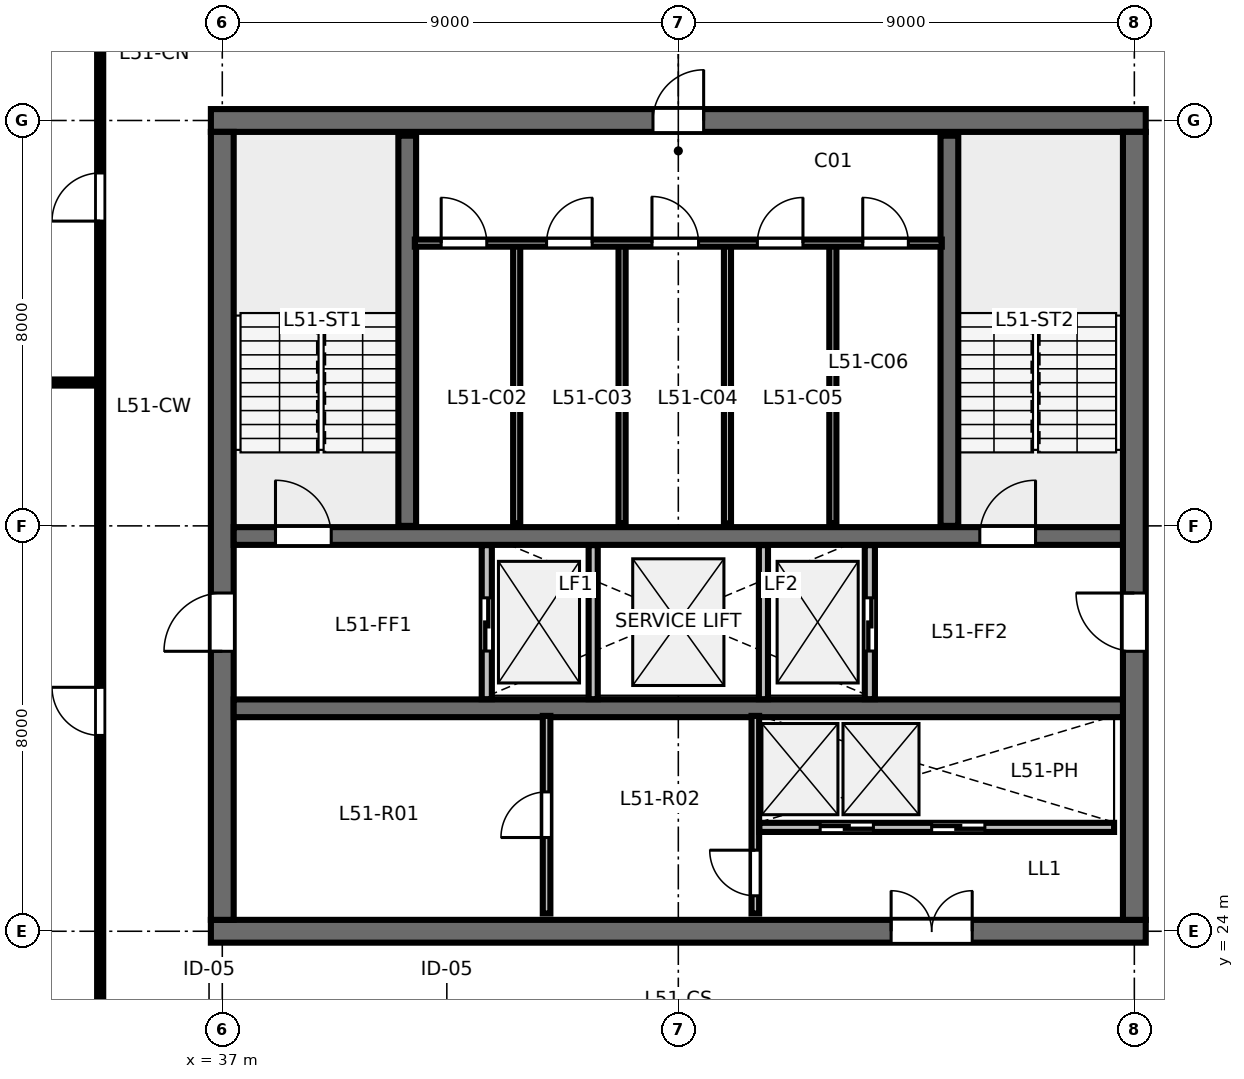
"""IFC4 building model, lengths in metres.
Left out: names, types, materials, properties, quantities, classifications, styles, units other than length and angle.
Written with IfcOpenShell. Run it as: python <this file> out.ifc"""

import sys

from ifc_helpers import new_model, si_unit, direction, frame, frame_2d, origin, place, context, subcontext, project, spatial, rectangle, extrude, element, fill, save


model = new_model("IFC4")
c1 = context("Model", 3, precision=1e-05, world=origin(), true_north=direction((0.0, 1.0)))
c2 = subcontext(c1, "Body", "Model", "MODEL_VIEW")
j1 = project(units=[si_unit("LENGTHUNIT", "METRE"), si_unit("PLANEANGLEUNIT", "RADIAN")], contexts=[c1])
p1 = place(None, origin())
s1 = spatial("IfcSite", under=j1, at=p1, CompositionType="ELEMENT")
p2 = place(p1, origin())
s2 = spatial("IfcBuilding", under=s1, at=p2, CompositionType="ELEMENT")
p3 = place(p2, frame((0.0, 0.0, 195.0)))
s3 = spatial("IfcBuildingStorey", under=s2, at=p3, CompositionType="ELEMENT", Elevation=195.0)
p4 = place(p3, frame((36.775, 24.0, 0.0), z_axis=(0.0, 0.0, 1.0), x_axis=(1.0, 0.0, 0.0)))
e1 = element("IfcWall", 1, at=p4, inside=s3, PredefinedType="SHEAR", context=c2, shape_type="SweptSolid", body=[
    extrude(rectangle(XDim=18.45, YDim=0.45, at=frame_2d((9.225, 0.0))), origin(), (0.0, 0.0, 1.0), 3.36),
])
p5 = place(p4, frame((13.425, 0.0, 0.0)))
e2 = element("IfcOpeningElement", 2, at=p5, cuts=e1, PredefinedType="OPENING", context=c2, shape_type="SweptSolid", body=[
    extrude(rectangle(XDim=1.6, YDim=2.15, at=frame_2d((0.8, 1.075))), frame((0.0, 0.235, 0.0), z_axis=(0.0, -1.0, 0.0), x_axis=(1.0, 0.0, 0.0)), (0.0, 0.0, 1.0), 0.47),
])
p6 = place(p3, frame((36.775, 40.0, 0.0), z_axis=(0.0, 0.0, 1.0), x_axis=(1.0, 0.0, 0.0)))
e3 = element("IfcWall", 3, at=p6, inside=s3, PredefinedType="SHEAR", context=c2, shape_type="SweptSolid", body=[
    extrude(rectangle(XDim=18.45, YDim=0.45, at=frame_2d((9.225, 0.0))), origin(), (0.0, 0.0, 1.0), 3.36),
])
p7 = place(p6, frame((8.725, 0.0, 0.0)))
e4 = element("IfcOpeningElement", 4, at=p7, cuts=e3, PredefinedType="OPENING", context=c2, shape_type="SweptSolid", body=[
    extrude(rectangle(XDim=1.0, YDim=2.15, at=frame_2d((0.5, 1.075))), frame((0.0, 0.235, 0.0), z_axis=(0.0, -1.0, 0.0), x_axis=(1.0, 0.0, 0.0)), (0.0, 0.0, 1.0), 0.47),
])
p8 = place(p3, frame((37.0, 24.225, 0.0), z_axis=(0.0, 0.0, 1.0), x_axis=(0.0, 1.0, 0.0)))
e5 = element("IfcWall", 5, at=p8, inside=s3, PredefinedType="SHEAR", context=c2, shape_type="SweptSolid", body=[
    extrude(rectangle(XDim=15.55, YDim=0.45, at=frame_2d((7.775, 0.0))), origin(), (0.0, 0.0, 1.0), 3.36),
])
p9 = place(p8, frame((5.3, 0.0, 0.0)))
e6 = element("IfcOpeningElement", 6, at=p9, cuts=e5, PredefinedType="OPENING", context=c2, shape_type="SweptSolid", body=[
    extrude(rectangle(XDim=1.15, YDim=2.15, at=frame_2d((0.575, 1.075))), frame((0.0, 0.235, 0.0), z_axis=(0.0, -1.0, 0.0), x_axis=(1.0, 0.0, 0.0)), (0.0, 0.0, 1.0), 0.47),
])
p10 = place(p3, frame((55.0, 24.225, 0.0), z_axis=(0.0, 0.0, 1.0), x_axis=(0.0, 1.0, 0.0)))
e7 = element("IfcWall", 7, at=p10, inside=s3, PredefinedType="SHEAR", context=c2, shape_type="SweptSolid", body=[
    extrude(rectangle(XDim=15.55, YDim=0.45, at=frame_2d((7.775, 0.0))), origin(), (0.0, 0.0, 1.0), 3.36),
])
p11 = place(p10, frame((5.3, 0.0, 0.0)))
e8 = element("IfcOpeningElement", 8, at=p11, cuts=e7, PredefinedType="OPENING", context=c2, shape_type="SweptSolid", body=[
    extrude(rectangle(XDim=1.15, YDim=2.15, at=frame_2d((0.575, 1.075))), frame((0.0, 0.235, 0.0), z_axis=(0.0, -1.0, 0.0), x_axis=(1.0, 0.0, 0.0)), (0.0, 0.0, 1.0), 0.47),
])
p12 = place(p3, frame((37.225, 31.8, 0.0), z_axis=(0.0, 0.0, 1.0), x_axis=(1.0, 0.0, 0.0)))
e9 = element("IfcWall", 9, at=p12, inside=s3, PredefinedType="SHEAR", context=c2, shape_type="SweptSolid", body=[
    extrude(rectangle(XDim=17.55, YDim=0.35, at=frame_2d((8.775, 0.0))), origin(), (0.0, 0.0, 1.0), 3.36),
])
p13 = place(p12, frame((0.825, 0.0, 0.0)))
e10 = element("IfcOpeningElement", 10, at=p13, cuts=e9, PredefinedType="OPENING", context=c2, shape_type="SweptSolid", body=[
    extrude(rectangle(XDim=1.1, YDim=2.15, at=frame_2d((0.55, 1.075))), frame((0.0, 0.185, 0.0), z_axis=(0.0, -1.0, 0.0), x_axis=(1.0, 0.0, 0.0)), (0.0, 0.0, 1.0), 0.37),
])
p14 = place(p12, frame((14.725, 0.0, 0.0)))
e11 = element("IfcOpeningElement", 11, at=p14, cuts=e9, PredefinedType="OPENING", context=c2, shape_type="SweptSolid", body=[
    extrude(rectangle(XDim=1.1, YDim=2.15, at=frame_2d((0.55, 1.075))), frame((0.0, 0.185, 0.0), z_axis=(0.0, -1.0, 0.0), x_axis=(1.0, 0.0, 0.0)), (0.0, 0.0, 1.0), 0.37),
])
p15 = place(p3, frame((37.225, 28.4, 0.0), z_axis=(0.0, 0.0, 1.0), x_axis=(1.0, 0.0, 0.0)))
e12 = element("IfcWall", 12, at=p15, inside=s3, PredefinedType="SHEAR", context=c2, shape_type="SweptSolid", body=[
    extrude(rectangle(XDim=17.55, YDim=0.35, at=frame_2d((8.775, 0.0))), origin(), (0.0, 0.0, 1.0), 3.36),
])
for number, where, z_axis, x_axis in (
    (13, (40.65, 32.0, 0.0), (0.0, 0.0, 1.0), (0.0, 1.0, 0.0)),
    (14, (51.35, 32.0, 0.0), (0.0, 0.0, 1.0), (0.0, 1.0, 0.0)),
):
    element("IfcWall", number, at=place(p3, frame(where, z_axis=z_axis, x_axis=x_axis)), inside=s3, PredefinedType="SHEAR", context=c2, shape_type="SweptSolid", body=[
        extrude(rectangle(XDim=7.7, YDim=0.35, at=frame_2d((3.85, 0.0))), origin(), (0.0, 0.0, 1.0), 3.6),
    ])
for number, where, z_axis, x_axis in (
    (15, (42.81, 32.05, 0.0), (0.0, 0.0, 1.0), (0.0, 1.0, 0.0)),
    (16, (44.89, 32.05, 0.0), (0.0, 0.0, 1.0), (0.0, 1.0, 0.0)),
    (17, (46.97, 32.05, 0.0), (0.0, 0.0, 1.0), (0.0, 1.0, 0.0)),
    (18, (49.05, 32.05, 0.0), (0.0, 0.0, 1.0), (0.0, 1.0, 0.0)),
):
    element("IfcWall", number, at=place(p3, frame(where, z_axis=z_axis, x_axis=x_axis)), inside=s3, PredefinedType="PARTITIONING", context=c2, shape_type="SweptSolid", body=[
        extrude(rectangle(XDim=5.5, YDim=0.14, at=frame_2d((2.75, 0.0))), origin(), (0.0, 0.0, 1.0), 3.375),
    ])
p16 = place(p3, frame((40.8, 37.58, 0.0), z_axis=(0.0, 0.0, 1.0), x_axis=(1.0, 0.0, 0.0)))
e19 = element("IfcWall", 19, at=p16, inside=s3, PredefinedType="PARTITIONING", context=c2, shape_type="SweptSolid", body=[
    extrude(rectangle(XDim=10.4, YDim=0.14, at=frame_2d((5.2, 0.0))), origin(), (0.0, 0.0, 1.0), 3.375),
])
p17 = place(p16, frame((0.52, 0.0, 0.0)))
e20 = element("IfcOpeningElement", 20, at=p17, cuts=e19, PredefinedType="OPENING", context=c2, shape_type="SweptSolid", body=[
    extrude(rectangle(XDim=0.9, YDim=2.15, at=frame_2d((0.45, 1.075))), frame((0.0, 0.08, 0.0), z_axis=(0.0, -1.0, 0.0), x_axis=(1.0, 0.0, 0.0)), (0.0, 0.0, 1.0), 0.16),
])
p18 = place(p16, frame((2.6, 0.0, 0.0)))
e21 = element("IfcOpeningElement", 21, at=p18, cuts=e19, PredefinedType="OPENING", context=c2, shape_type="SweptSolid", body=[
    extrude(rectangle(XDim=0.9, YDim=2.15, at=frame_2d((0.45, 1.075))), frame((0.0, 0.08, 0.0), z_axis=(0.0, -1.0, 0.0), x_axis=(1.0, 0.0, 0.0)), (0.0, 0.0, 1.0), 0.16),
])
p19 = place(p16, frame((4.68, 0.0, 0.0)))
e22 = element("IfcOpeningElement", 22, at=p19, cuts=e19, PredefinedType="OPENING", context=c2, shape_type="SweptSolid", body=[
    extrude(rectangle(XDim=0.92, YDim=2.15, at=frame_2d((0.46, 1.075))), frame((0.0, 0.08, 0.0), z_axis=(0.0, -1.0, 0.0), x_axis=(1.0, 0.0, 0.0)), (0.0, 0.0, 1.0), 0.16),
])
p20 = place(p16, frame((6.76, 0.0, 0.0)))
e23 = element("IfcOpeningElement", 23, at=p20, cuts=e19, PredefinedType="OPENING", context=c2, shape_type="SweptSolid", body=[
    extrude(rectangle(XDim=0.9, YDim=2.15, at=frame_2d((0.45, 1.075))), frame((0.0, 0.08, 0.0), z_axis=(0.0, -1.0, 0.0), x_axis=(1.0, 0.0, 0.0)), (0.0, 0.0, 1.0), 0.16),
])
p21 = place(p16, frame((8.84, 0.0, 0.0)))
e24 = element("IfcOpeningElement", 24, at=p21, cuts=e19, PredefinedType="OPENING", context=c2, shape_type="SweptSolid", body=[
    extrude(rectangle(XDim=0.9, YDim=2.15, at=frame_2d((0.45, 1.075))), frame((0.0, 0.08, 0.0), z_axis=(0.0, -1.0, 0.0), x_axis=(1.0, 0.0, 0.0)), (0.0, 0.0, 1.0), 0.16),
])
p22 = place(p3, frame((42.22, 28.58, 0.0), z_axis=(0.0, 0.0, 1.0), x_axis=(0.0, 1.0, 0.0)))
e25 = element("IfcWall", 25, at=p22, inside=s3, PredefinedType="PARTITIONING", context=c2, shape_type="SweptSolid", body=[
    extrude(rectangle(XDim=3.04, YDim=0.2, at=frame_2d((1.52, 0.0))), origin(), (0.0, 0.0, 1.0), 3.375),
])
p23 = place(p22, frame((0.95, 0.0, 0.0)))
e26 = element("IfcOpeningElement", 26, at=p23, cuts=e25, PredefinedType="OPENING", context=c2, shape_type="SweptSolid", body=[
    extrude(rectangle(XDim=1.05, YDim=2.15, at=frame_2d((0.525, 1.075))), frame((0.0, 0.11, 0.0), z_axis=(0.0, -1.0, 0.0), x_axis=(1.0, 0.0, 0.0)), (0.0, 0.0, 1.0), 0.22),
])
p24 = place(p3, frame((49.78, 28.58, 0.0), z_axis=(0.0, 0.0, 1.0), x_axis=(0.0, 1.0, 0.0)))
e27 = element("IfcWall", 27, at=p24, inside=s3, PredefinedType="PARTITIONING", context=c2, shape_type="SweptSolid", body=[
    extrude(rectangle(XDim=3.04, YDim=0.2, at=frame_2d((1.52, 0.0))), origin(), (0.0, 0.0, 1.0), 3.375),
])
p25 = place(p24, frame((0.95, 0.0, 0.0)))
e28 = element("IfcOpeningElement", 28, at=p25, cuts=e27, PredefinedType="OPENING", context=c2, shape_type="SweptSolid", body=[
    extrude(rectangle(XDim=1.05, YDim=2.15, at=frame_2d((0.525, 1.075))), frame((0.0, 0.11, 0.0), z_axis=(0.0, -1.0, 0.0), x_axis=(1.0, 0.0, 0.0)), (0.0, 0.0, 1.0), 0.22),
])
for number, where, z_axis, x_axis in (
    (29, (44.32, 28.58, 0.0), (0.0, 0.0, 1.0), (0.0, 1.0, 0.0)),
    (30, (47.68, 28.58, 0.0), (0.0, 0.0, 1.0), (0.0, 1.0, 0.0)),
):
    element("IfcWall", number, at=place(p3, frame(where, z_axis=z_axis, x_axis=x_axis)), inside=s3, PredefinedType="PARTITIONING", context=c2, shape_type="SweptSolid", body=[
        extrude(rectangle(XDim=3.04, YDim=0.18, at=frame_2d((1.52, 0.0))), origin(), (0.0, 0.0, 1.0), 3.375),
    ])
p26 = place(p3, frame((43.4, 24.35, 0.0), z_axis=(0.0, 0.0, 1.0), x_axis=(0.0, 1.0, 0.0)))
e31 = element("IfcWall", 31, at=p26, inside=s3, PredefinedType="PARTITIONING", context=c2, shape_type="SweptSolid", body=[
    extrude(rectangle(XDim=3.9, YDim=0.15, at=frame_2d((1.95, 0.0))), origin(), (0.0, 0.0, 1.0), 3.375),
])
p27 = place(p26, frame((1.5, 0.0, 0.0)))
e32 = element("IfcOpeningElement", 32, at=p27, cuts=e31, PredefinedType="OPENING", context=c2, shape_type="SweptSolid", body=[
    extrude(rectangle(XDim=0.9, YDim=2.15, at=frame_2d((0.45, 1.075))), frame((0.0, 0.085, 0.0), z_axis=(0.0, -1.0, 0.0), x_axis=(1.0, 0.0, 0.0)), (0.0, 0.0, 1.0), 0.17),
])
p28 = place(p3, frame((47.52, 24.35, 0.0), z_axis=(0.0, 0.0, 1.0), x_axis=(0.0, 1.0, 0.0)))
e33 = element("IfcWall", 33, at=p28, inside=s3, PredefinedType="PARTITIONING", context=c2, shape_type="SweptSolid", body=[
    extrude(rectangle(XDim=3.9, YDim=0.15, at=frame_2d((1.95, 0.0))), origin(), (0.0, 0.0, 1.0), 3.375),
])
p29 = place(p28, frame((0.35, 0.0, 0.0)))
e34 = element("IfcOpeningElement", 34, at=p29, cuts=e33, PredefinedType="OPENING", context=c2, shape_type="SweptSolid", body=[
    extrude(rectangle(XDim=0.9, YDim=2.15, at=frame_2d((0.45, 1.075))), frame((0.0, 0.085, 0.0), z_axis=(0.0, -1.0, 0.0), x_axis=(1.0, 0.0, 0.0)), (0.0, 0.0, 1.0), 0.17),
])
p30 = place(p3, frame((47.6, 26.05, 0.0), z_axis=(0.0, 0.0, 1.0), x_axis=(1.0, 0.0, 0.0)))
e35 = element("IfcWall", 35, at=p30, inside=s3, PredefinedType="PARTITIONING", context=c2, shape_type="SweptSolid", body=[
    extrude(rectangle(XDim=7.0, YDim=0.18, at=frame_2d((3.5, 0.0))), origin(), (0.0, 0.0, 1.0), 3.375),
])
p31 = place(p30, frame((1.2, 0.0, 0.0)))
e36 = element("IfcOpeningElement", 36, at=p31, cuts=e35, PredefinedType="OPENING", context=c2, shape_type="SweptSolid", body=[
    extrude(rectangle(XDim=1.05, YDim=2.15, at=frame_2d((0.525, 1.075))), frame((0.0, 0.1, 0.0), z_axis=(0.0, -1.0, 0.0), x_axis=(1.0, 0.0, 0.0)), (0.0, 0.0, 1.0), 0.2),
])
p32 = place(p30, frame((3.4, 0.0, 0.0)))
e37 = element("IfcOpeningElement", 37, at=p32, cuts=e35, PredefinedType="OPENING", context=c2, shape_type="SweptSolid", body=[
    extrude(rectangle(XDim=1.05, YDim=2.15, at=frame_2d((0.525, 1.075))), frame((0.0, 0.1, 0.0), z_axis=(0.0, -1.0, 0.0), x_axis=(1.0, 0.0, 0.0)), (0.0, 0.0, 1.0), 0.2),
])
p33 = place(p3, frame((34.59, 34.829, 0.0), z_axis=(0.0, 0.0, 1.0), x_axis=(-1.0, 0.0, 0.0)))
e38 = element("IfcWall", 38, at=p33, inside=s3, PredefinedType="PARTITIONING", context=c2, shape_type="SweptSolid", body=[
    extrude(rectangle(XDim=10.19, YDim=0.12, at=frame_2d((5.095, 0.0))), origin(), (0.0, 0.0, 1.0), 2.655),
])
p34 = place(p33, frame((1.4, 0.0, 0.0)))
e39 = element("IfcOpeningElement", 39, at=p34, cuts=e38, PredefinedType="OPENING", context=c2, shape_type="SweptSolid", body=[
    extrude(rectangle(XDim=0.9, YDim=2.15, at=frame_2d((0.45, 1.075))), frame((0.0, 0.07, 0.0), z_axis=(0.0, -1.0, 0.0), x_axis=(1.0, 0.0, 0.0)), (0.0, 0.0, 1.0), 0.14),
])
p35 = place(p3, frame((34.59, 21.65, 0.0), z_axis=(0.0, 0.0, 1.0), x_axis=(0.0, 1.0, 0.0)))
e40 = element("IfcWall", 40, at=p35, inside=s3, PredefinedType="PARTITIONING", context=c2, shape_type="SweptSolid", body=[
    extrude(rectangle(XDim=20.7, YDim=0.12, at=frame_2d((10.35, 0.0))), origin(), (0.0, 0.0, 1.0), 2.655),
])
p36 = place(p35, frame((6.214, 0.0, 0.0)))
e41 = element("IfcOpeningElement", 41, at=p36, cuts=e40, PredefinedType="OPENING", context=c2, shape_type="SweptSolid", body=[
    extrude(rectangle(XDim=0.95, YDim=2.15, at=frame_2d((0.475, 1.075))), frame((0.0, 0.07, 0.0), z_axis=(0.0, -1.0, 0.0), x_axis=(1.0, 0.0, 0.0)), (0.0, 0.0, 1.0), 0.14),
])
p37 = place(p35, frame((16.365, 0.0, 0.0)))
e42 = element("IfcOpeningElement", 42, at=p37, cuts=e40, PredefinedType="OPENING", context=c2, shape_type="SweptSolid", body=[
    extrude(rectangle(XDim=0.95, YDim=2.15, at=frame_2d((0.475, 1.075))), frame((0.0, 0.07, 0.0), z_axis=(0.0, -1.0, 0.0), x_axis=(1.0, 0.0, 0.0)), (0.0, 0.0, 1.0), 0.14),
])
p38 = place(p13, origin())
e43 = element("IfcDoor", 43, at=p38, inside=s3, OperationType="SINGLE_SWING_LEFT", PredefinedType="DOOR", context=c2, shape_type="SweptSolid", body=[
    extrude(rectangle(XDim=1.1, YDim=2.15, at=frame_2d((0.55, 1.075))), frame((0.0, 0.025, 0.0), z_axis=(0.0, -1.0, 0.0), x_axis=(1.0, 0.0, 0.0)), (0.0, 0.0, 1.0), 0.05),
])
fill(e10, e43)
p39 = place(p14, origin())
e44 = element("IfcDoor", 44, at=p39, inside=s3, OperationType="SINGLE_SWING_RIGHT", PredefinedType="DOOR", context=c2, shape_type="SweptSolid", body=[
    extrude(rectangle(XDim=1.1, YDim=2.15, at=frame_2d((0.55, 1.075))), frame((0.0, 0.025, 0.0), z_axis=(0.0, -1.0, 0.0), x_axis=(1.0, 0.0, 0.0)), (0.0, 0.0, 1.0), 0.05),
])
fill(e11, e44)
p40 = place(p7, origin())
e45 = element("IfcDoor", 45, at=p40, inside=s3, OperationType="SINGLE_SWING_RIGHT", PredefinedType="DOOR", context=c2, shape_type="SweptSolid", body=[
    extrude(rectangle(XDim=1.0, YDim=2.15, at=frame_2d((0.5, 1.075))), frame((0.0, 0.025, 0.0), z_axis=(0.0, -1.0, 0.0), x_axis=(1.0, 0.0, 0.0)), (0.0, 0.0, 1.0), 0.05),
])
fill(e4, e45)
p41 = place(p9, origin())
e46 = element("IfcDoor", 46, at=p41, inside=s3, OperationType="SINGLE_SWING_LEFT", PredefinedType="DOOR", context=c2, shape_type="SweptSolid", body=[
    extrude(rectangle(XDim=1.15, YDim=2.15, at=frame_2d((0.575, 1.075))), frame((0.0, 0.025, 0.0), z_axis=(0.0, -1.0, 0.0), x_axis=(1.0, 0.0, 0.0)), (0.0, 0.0, 1.0), 0.05),
])
fill(e6, e46)
p42 = place(p11, origin())
e47 = element("IfcDoor", 47, at=p42, inside=s3, OperationType="SINGLE_SWING_RIGHT", PredefinedType="DOOR", context=c2, shape_type="SweptSolid", body=[
    extrude(rectangle(XDim=1.15, YDim=2.15, at=frame_2d((0.575, 1.075))), frame((0.0, 0.025, 0.0), z_axis=(0.0, -1.0, 0.0), x_axis=(1.0, 0.0, 0.0)), (0.0, 0.0, 1.0), 0.05),
])
fill(e8, e47)
p43 = place(p5, origin())
e48 = element("IfcDoor", 48, at=p43, inside=s3, OperationType="DOUBLE_DOOR_SINGLE_SWING", PredefinedType="DOOR", context=c2, shape_type="SweptSolid", body=[
    extrude(rectangle(XDim=1.6, YDim=2.15, at=frame_2d((0.8, 1.075))), frame((0.0, 0.025, 0.0), z_axis=(0.0, -1.0, 0.0), x_axis=(1.0, 0.0, 0.0)), (0.0, 0.0, 1.0), 0.05),
])
fill(e2, e48)
p44 = place(p17, origin())
e49 = element("IfcDoor", 49, at=p44, inside=s3, OperationType="SINGLE_SWING_LEFT", PredefinedType="DOOR", context=c2, shape_type="SweptSolid", body=[
    extrude(rectangle(XDim=0.9, YDim=2.15, at=frame_2d((0.45, 1.075))), frame((0.0, 0.025, 0.0), z_axis=(0.0, -1.0, 0.0), x_axis=(1.0, 0.0, 0.0)), (0.0, 0.0, 1.0), 0.05),
])
fill(e20, e49)
p45 = place(p18, origin())
e50 = element("IfcDoor", 50, at=p45, inside=s3, OperationType="SINGLE_SWING_RIGHT", PredefinedType="DOOR", context=c2, shape_type="SweptSolid", body=[
    extrude(rectangle(XDim=0.9, YDim=2.15, at=frame_2d((0.45, 1.075))), frame((0.0, 0.025, 0.0), z_axis=(0.0, -1.0, 0.0), x_axis=(1.0, 0.0, 0.0)), (0.0, 0.0, 1.0), 0.05),
])
fill(e21, e50)
p46 = place(p19, origin())
e51 = element("IfcDoor", 51, at=p46, inside=s3, OperationType="SINGLE_SWING_LEFT", PredefinedType="DOOR", context=c2, shape_type="SweptSolid", body=[
    extrude(rectangle(XDim=0.92, YDim=2.15, at=frame_2d((0.46, 1.075))), frame((0.0, 0.025, 0.0), z_axis=(0.0, -1.0, 0.0), x_axis=(1.0, 0.0, 0.0)), (0.0, 0.0, 1.0), 0.05),
])
fill(e22, e51)
p47 = place(p20, origin())
e52 = element("IfcDoor", 52, at=p47, inside=s3, OperationType="SINGLE_SWING_RIGHT", PredefinedType="DOOR", context=c2, shape_type="SweptSolid", body=[
    extrude(rectangle(XDim=0.9, YDim=2.15, at=frame_2d((0.45, 1.075))), frame((0.0, 0.025, 0.0), z_axis=(0.0, -1.0, 0.0), x_axis=(1.0, 0.0, 0.0)), (0.0, 0.0, 1.0), 0.05),
])
fill(e23, e52)
p48 = place(p21, origin())
e53 = element("IfcDoor", 53, at=p48, inside=s3, OperationType="SINGLE_SWING_LEFT", PredefinedType="DOOR", context=c2, shape_type="SweptSolid", body=[
    extrude(rectangle(XDim=0.9, YDim=2.15, at=frame_2d((0.45, 1.075))), frame((0.0, 0.025, 0.0), z_axis=(0.0, -1.0, 0.0), x_axis=(1.0, 0.0, 0.0)), (0.0, 0.0, 1.0), 0.05),
])
fill(e24, e53)
p49 = place(p23, origin())
e54 = element("IfcDoor", 54, at=p49, inside=s3, OperationType="SLIDING_TO_LEFT", PredefinedType="DOOR", context=c2, shape_type="SweptSolid", body=[
    extrude(rectangle(XDim=1.05, YDim=2.15, at=frame_2d((0.525, 1.075))), frame((0.0, 0.025, 0.0), z_axis=(0.0, -1.0, 0.0), x_axis=(1.0, 0.0, 0.0)), (0.0, 0.0, 1.0), 0.05),
])
fill(e26, e54)
p50 = place(p25, origin())
e55 = element("IfcDoor", 55, at=p50, inside=s3, OperationType="SLIDING_TO_RIGHT", PredefinedType="DOOR", context=c2, shape_type="SweptSolid", body=[
    extrude(rectangle(XDim=1.05, YDim=2.15, at=frame_2d((0.525, 1.075))), frame((0.0, 0.025, 0.0), z_axis=(0.0, -1.0, 0.0), x_axis=(1.0, 0.0, 0.0)), (0.0, 0.0, 1.0), 0.05),
])
fill(e28, e55)
p51 = place(p27, origin())
e56 = element("IfcDoor", 56, at=p51, inside=s3, OperationType="SINGLE_SWING_LEFT", PredefinedType="DOOR", context=c2, shape_type="SweptSolid", body=[
    extrude(rectangle(XDim=0.9, YDim=2.15, at=frame_2d((0.45, 1.075))), frame((0.0, 0.025, 0.0), z_axis=(0.0, -1.0, 0.0), x_axis=(1.0, 0.0, 0.0)), (0.0, 0.0, 1.0), 0.05),
])
fill(e32, e56)
p52 = place(p29, origin())
e57 = element("IfcDoor", 57, at=p52, inside=s3, OperationType="SINGLE_SWING_RIGHT", PredefinedType="DOOR", context=c2, shape_type="SweptSolid", body=[
    extrude(rectangle(XDim=0.9, YDim=2.15, at=frame_2d((0.45, 1.075))), frame((0.0, 0.025, 0.0), z_axis=(0.0, -1.0, 0.0), x_axis=(1.0, 0.0, 0.0)), (0.0, 0.0, 1.0), 0.05),
])
fill(e34, e57)
p53 = place(p31, origin())
e58 = element("IfcDoor", 58, at=p53, inside=s3, OperationType="SLIDING_TO_LEFT", PredefinedType="DOOR", context=c2, shape_type="SweptSolid", body=[
    extrude(rectangle(XDim=1.05, YDim=2.15, at=frame_2d((0.525, 1.075))), frame((0.0, 0.025, 0.0), z_axis=(0.0, -1.0, 0.0), x_axis=(1.0, 0.0, 0.0)), (0.0, 0.0, 1.0), 0.05),
])
fill(e36, e58)
p54 = place(p32, origin())
e59 = element("IfcDoor", 59, at=p54, inside=s3, OperationType="SLIDING_TO_RIGHT", PredefinedType="DOOR", context=c2, shape_type="SweptSolid", body=[
    extrude(rectangle(XDim=1.05, YDim=2.15, at=frame_2d((0.525, 1.075))), frame((0.0, 0.025, 0.0), z_axis=(0.0, -1.0, 0.0), x_axis=(1.0, 0.0, 0.0)), (0.0, 0.0, 1.0), 0.05),
])
fill(e37, e59)
p55 = place(p36, origin())
e60 = element("IfcDoor", 60, at=p55, inside=s3, OperationType="SINGLE_SWING_RIGHT", PredefinedType="DOOR", context=c2, shape_type="SweptSolid", body=[
    extrude(rectangle(XDim=0.95, YDim=2.15, at=frame_2d((0.475, 1.075))), frame((0.0, 0.025, 0.0), z_axis=(0.0, -1.0, 0.0), x_axis=(1.0, 0.0, 0.0)), (0.0, 0.0, 1.0), 0.05),
])
fill(e41, e60)
p56 = place(p37, origin())
e61 = element("IfcDoor", 61, at=p56, inside=s3, OperationType="SINGLE_SWING_LEFT", PredefinedType="DOOR", context=c2, shape_type="SweptSolid", body=[
    extrude(rectangle(XDim=0.95, YDim=2.15, at=frame_2d((0.475, 1.075))), frame((0.0, 0.025, 0.0), z_axis=(0.0, -1.0, 0.0), x_axis=(1.0, 0.0, 0.0)), (0.0, 0.0, 1.0), 0.05),
])
fill(e42, e61)
save(model, sys.argv[1])
